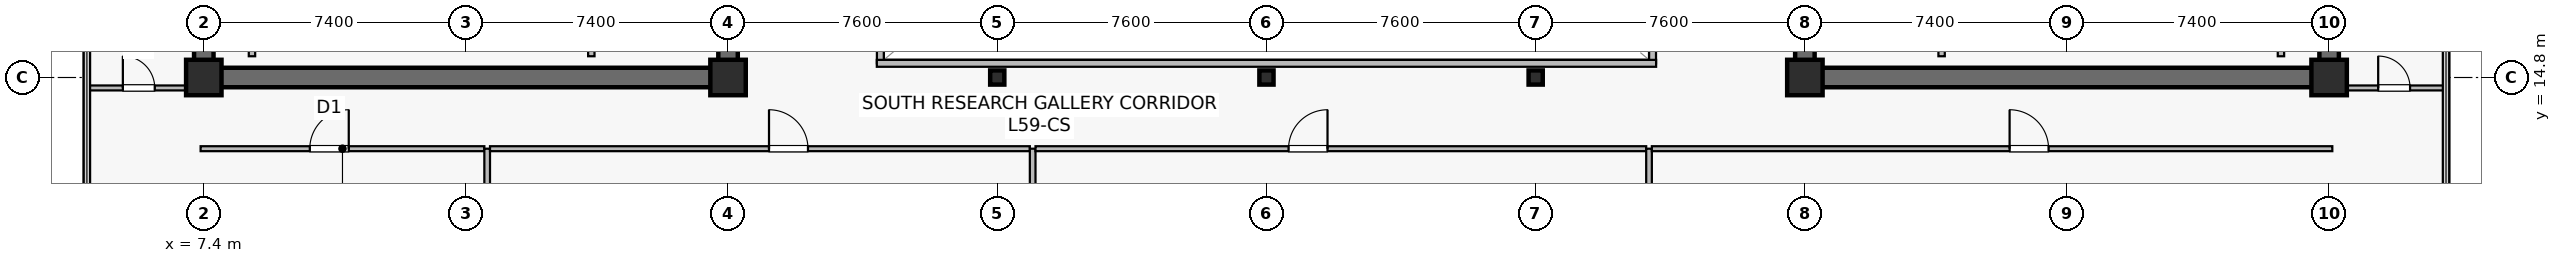
"""IFC4 building model, lengths in metres.
Left out: names, types, materials, properties, quantities, classifications, styles, units other than length and angle.
Written with IfcOpenShell. Run it as: python <this file> out.ifc"""

import sys

from ifc_helpers import new_model, si_unit, direction, frame, frame_2d, origin, origin_2d, place, context, subcontext, project, spatial, rectangle, hollow_rectangle, extrude, source, transform, mapped, element, fill, save


model = new_model("IFC4")
c1 = context("Model", 3, precision=1e-05, world=origin(), true_north=direction((0.0, 1.0)))
c2 = subcontext(c1, "Body", "Model", "MODEL_VIEW")
j1 = project(units=[si_unit("LENGTHUNIT", "METRE"), si_unit("PLANEANGLEUNIT", "RADIAN")], contexts=[c1])
p1 = place(None, origin())
s1 = spatial("IfcSite", under=j1, at=p1, CompositionType="ELEMENT")
p2 = place(p1, origin())
s2 = spatial("IfcBuilding", under=s1, at=p2, CompositionType="ELEMENT")
p3 = place(p2, frame((0.0, 0.0, 246.5)))
s3 = spatial("IfcBuildingStorey", under=s2, at=p3, CompositionType="ELEMENT", Elevation=246.5)
p4 = place(p3, frame((7.125, 14.8, 0.0), z_axis=(0.0, 0.0, 1.0), x_axis=(1.0, 0.0, 0.0)))
e1 = element("IfcWall", 1, at=p4, inside=s3, PredefinedType="SHEAR", context=c2, shape_type="SweptSolid", body=[
    extrude(rectangle(XDim=15.35, YDim=0.55, at=frame_2d((7.675, 0.0))), origin(), (0.0, 0.0, 1.0), 3.8),
])
p5 = place(p3, frame((7.4, 15.075, 0.0), z_axis=(0.0, 0.0, 1.0), x_axis=(0.0, 1.0, 0.0)))
e2 = element("IfcWall", 2, at=p5, inside=s3, PredefinedType="SHEAR", context=c2, shape_type="SweptSolid", body=[
    extrude(rectangle(XDim=18.45, YDim=0.55, at=frame_2d((9.225, 0.0))), origin(), (0.0, 0.0, 1.0), 3.8),
])
p6 = place(p3, frame((22.2, 15.075, 0.0), z_axis=(0.0, 0.0, 1.0), x_axis=(0.0, 1.0, 0.0)))
e3 = element("IfcWall", 3, at=p6, inside=s3, PredefinedType="SHEAR", context=c2, shape_type="SweptSolid", body=[
    extrude(rectangle(XDim=18.45, YDim=0.55, at=frame_2d((9.225, 0.0))), origin(), (0.0, 0.0, 1.0), 3.8),
])
p7 = place(p6, frame((3.475, 0.0, 0.0)))
e4 = element("IfcOpeningElement", 4, at=p7, cuts=e3, PredefinedType="OPENING", context=c2, shape_type="SweptSolid", body=[
    extrude(rectangle(XDim=1.42, YDim=2.2, at=frame_2d((0.71, 1.1))), frame((0.0, 0.285, 0.0), z_axis=(0.0, -1.0, 0.0), x_axis=(1.0, 0.0, 0.0)), (0.0, 0.0, 1.0), 0.57),
])
p8 = place(p3, frame((52.325, 14.8, 0.0), z_axis=(0.0, 0.0, 1.0), x_axis=(1.0, 0.0, 0.0)))
e5 = element("IfcWall", 5, at=p8, inside=s3, PredefinedType="SHEAR", context=c2, shape_type="SweptSolid", body=[
    extrude(rectangle(XDim=15.35, YDim=0.55, at=frame_2d((7.675, 0.0))), origin(), (0.0, 0.0, 1.0), 3.8),
])
p9 = place(p3, frame((52.6, 15.075, 0.0), z_axis=(0.0, 0.0, 1.0), x_axis=(0.0, 1.0, 0.0)))
e6 = element("IfcWall", 6, at=p9, inside=s3, PredefinedType="SHEAR", context=c2, shape_type="SweptSolid", body=[
    extrude(rectangle(XDim=18.45, YDim=0.55, at=frame_2d((9.225, 0.0))), origin(), (0.0, 0.0, 1.0), 3.8),
])
p10 = place(p9, frame((3.475, 0.0, 0.0)))
e7 = element("IfcOpeningElement", 7, at=p10, cuts=e6, PredefinedType="OPENING", context=c2, shape_type="SweptSolid", body=[
    extrude(rectangle(XDim=1.42, YDim=2.2, at=frame_2d((0.71, 1.1))), frame((0.0, 0.285, 0.0), z_axis=(0.0, -1.0, 0.0), x_axis=(1.0, 0.0, 0.0)), (0.0, 0.0, 1.0), 0.57),
])
p11 = place(p3, frame((67.4, 15.075, 0.0), z_axis=(0.0, 0.0, 1.0), x_axis=(0.0, 1.0, 0.0)))
e8 = element("IfcWall", 8, at=p11, inside=s3, PredefinedType="SHEAR", context=c2, shape_type="SweptSolid", body=[
    extrude(rectangle(XDim=18.45, YDim=0.55, at=frame_2d((9.225, 0.0))), origin(), (0.0, 0.0, 1.0), 3.8),
])
m1 = source(origin(), c2, "Body", "SweptSolid", [
    extrude(rectangle(XDim=1.0, YDim=1.0, at=origin_2d()), origin(), (0.0, 0.0, 1.0), 4.1),
])
for number, where, z_axis, x_axis in (
    (9, (7.4, 14.8, 0.0), (0.0, 0.0, 1.0), (1.0, 0.0, 0.0)),
    (10, (22.2, 14.8, 0.0), (0.0, 0.0, 1.0), (1.0, 0.0, 0.0)),
    (11, (52.6, 14.8, 0.0), (0.0, 0.0, 1.0), (1.0, 0.0, 0.0)),
    (12, (67.4, 14.8, 0.0), (0.0, 0.0, 1.0), (1.0, 0.0, 0.0)),
):
    element("IfcColumn", number, at=place(p3, frame(where, z_axis=z_axis, x_axis=x_axis)), inside=s3, PredefinedType="COLUMN", context=c2, shape_type="MappedRepresentation", body=[
        mapped(m1, transform((0.0, 0.0, 0.0), scale=1.0)),
    ])
m2 = source(origin(), c2, "Body", "SweptSolid", [
    extrude(hollow_rectangle(XDim=0.4, YDim=0.4, WallThickness=0.019, at=origin_2d()), origin(), (0.0, 0.0, 1.0), 4.1),
])
for number, where, z_axis, x_axis in (
    (13, (29.8, 14.8, 0.0), (0.0, 0.0, 1.0), (1.0, 0.0, 0.0)),
    (14, (37.4, 14.8, 0.0), (0.0, 0.0, 1.0), (1.0, 0.0, 0.0)),
    (15, (45.0, 14.8, 0.0), (0.0, 0.0, 1.0), (1.0, 0.0, 0.0)),
):
    element("IfcColumn", number, at=place(p3, frame(where, z_axis=z_axis, x_axis=x_axis)), inside=s3, PredefinedType="COLUMN", context=c2, shape_type="MappedRepresentation", body=[
        mapped(m2, transform((0.0, 0.0, 0.0), scale=1.0)),
    ])
for number, where, z_axis, x_axis in (
    (16, (18.34, 15.4, 0.0), (0.0, 0.0, 1.0), (0.0, 1.0, 0.0)),
    (17, (8.76, 15.4, 0.0), (0.0, 0.0, 1.0), (0.0, 1.0, 0.0)),
    (18, (56.46, 15.4, 0.0), (0.0, 0.0, 1.0), (0.0, 1.0, 0.0)),
    (19, (66.04, 15.4, 0.0), (0.0, 0.0, 1.0), (0.0, 1.0, 0.0)),
):
    element("IfcWall", number, at=place(p3, frame(where, z_axis=z_axis, x_axis=x_axis)), inside=s3, PredefinedType="SOLIDWALL", context=c2, shape_type="SweptSolid", body=[
        extrude(rectangle(XDim=2.4, YDim=0.18, at=frame_2d((1.2, 0.0))), origin(), (0.0, 0.0, 1.0), 3.8),
    ])
p12 = place(p3, frame((26.5, 15.2, 0.0), z_axis=(0.0, 0.0, 1.0), x_axis=(0.0, 1.0, 0.0)))
e20 = element("IfcWall", 20, at=p12, inside=s3, PredefinedType="SOLIDWALL", context=c2, shape_type="SweptSolid", body=[
    extrude(rectangle(XDim=18.2, YDim=0.195, at=frame_2d((9.1, 0.0))), origin(), (0.0, 0.0, 1.0), 3.8),
])
p13 = place(p12, frame((1.8, 0.0, 0.9)))
e21 = element("IfcOpeningElement", 21, at=p13, cuts=e20, PredefinedType="OPENING", context=c2, shape_type="SweptSolid", body=[
    extrude(rectangle(XDim=1.2, YDim=1.35, at=frame_2d((0.6, 0.675))), frame((0.0, 0.107, 0.0), z_axis=(0.0, -1.0, 0.0), x_axis=(1.0, 0.0, 0.0)), (0.0, 0.0, 1.0), 0.215),
])
p14 = place(p12, frame((13.2, 0.0, 0.9)))
e22 = element("IfcOpeningElement", 22, at=p14, cuts=e20, PredefinedType="OPENING", context=c2, shape_type="SweptSolid", body=[
    extrude(rectangle(XDim=1.2, YDim=1.35, at=frame_2d((0.6, 0.675))), frame((0.0, 0.107, 0.0), z_axis=(0.0, -1.0, 0.0), x_axis=(1.0, 0.0, 0.0)), (0.0, 0.0, 1.0), 0.215),
])
p15 = place(p3, frame((48.3, 15.2, 0.0), z_axis=(0.0, 0.0, 1.0), x_axis=(0.0, 1.0, 0.0)))
e23 = element("IfcWall", 23, at=p15, inside=s3, PredefinedType="SOLIDWALL", context=c2, shape_type="SweptSolid", body=[
    extrude(rectangle(XDim=18.2, YDim=0.195, at=frame_2d((9.1, 0.0))), origin(), (0.0, 0.0, 1.0), 3.8),
])
p16 = place(p15, frame((1.8, 0.0, 0.9)))
e24 = element("IfcOpeningElement", 24, at=p16, cuts=e23, PredefinedType="OPENING", context=c2, shape_type="SweptSolid", body=[
    extrude(rectangle(XDim=1.2, YDim=1.35, at=frame_2d((0.6, 0.675))), frame((0.0, 0.107, 0.0), z_axis=(0.0, -1.0, 0.0), x_axis=(1.0, 0.0, 0.0)), (0.0, 0.0, 1.0), 0.215),
])
p17 = place(p15, frame((13.2, 0.0, 0.9)))
e25 = element("IfcOpeningElement", 25, at=p17, cuts=e23, PredefinedType="OPENING", context=c2, shape_type="SweptSolid", body=[
    extrude(rectangle(XDim=1.2, YDim=1.35, at=frame_2d((0.6, 0.675))), frame((0.0, 0.107, 0.0), z_axis=(0.0, -1.0, 0.0), x_axis=(1.0, 0.0, 0.0)), (0.0, 0.0, 1.0), 0.215),
])
p18 = place(p3, frame((26.4, 15.2, 0.0), z_axis=(0.0, 0.0, 1.0), x_axis=(1.0, 0.0, 0.0)))
e26 = element("IfcWall", 26, at=p18, inside=s3, PredefinedType="SOLIDWALL", context=c2, shape_type="SweptSolid", body=[
    extrude(rectangle(XDim=22.0, YDim=0.195, at=frame_2d((11.0, 0.0))), origin(), (0.0, 0.0, 1.0), 3.8),
])
p19 = place(p3, frame((7.31, 12.79, 0.0), z_axis=(0.0, 0.0, 1.0), x_axis=(1.0, 0.0, 0.0)))
e27 = element("IfcWall", 27, at=p19, inside=s3, PredefinedType="PARTITIONING", context=c2, shape_type="SweptSolid", body=[
    extrude(rectangle(XDim=8.01, YDim=0.14, at=frame_2d((4.005, 0.0))), origin(), (0.0, 0.0, 1.0), 3.197),
])
p20 = place(p19, frame((3.083, 0.0, 0.0)))
e28 = element("IfcOpeningElement", 28, at=p20, cuts=e27, PredefinedType="OPENING", context=c2, shape_type="SweptSolid", body=[
    extrude(rectangle(XDim=1.1, YDim=2.18, at=frame_2d((0.55, 1.09))), frame((0.0, 0.08, 0.0), z_axis=(0.0, -1.0, 0.0), x_axis=(1.0, 0.0, 0.0)), (0.0, 0.0, 1.0), 0.16),
])
p21 = place(p3, frame((15.4, 2.71, 0.0), z_axis=(0.0, 0.0, 1.0), x_axis=(0.0, 1.0, 0.0)))
e29 = element("IfcWall", 29, at=p21, inside=s3, PredefinedType="PARTITIONING", context=c2, shape_type="SweptSolid", body=[
    extrude(rectangle(XDim=10.08, YDim=0.16, at=frame_2d((5.04, 0.0))), origin(), (0.0, 0.0, 1.0), 3.135),
])
p22 = place(p3, frame((15.48, 12.79, 0.0), z_axis=(0.0, 0.0, 1.0), x_axis=(1.0, 0.0, 0.0)))
e30 = element("IfcWall", 30, at=p22, inside=s3, PredefinedType="PARTITIONING", context=c2, shape_type="SweptSolid", body=[
    extrude(rectangle(XDim=15.24, YDim=0.14, at=frame_2d((7.62, 0.0))), origin(), (0.0, 0.0, 1.0), 3.197),
])
p23 = place(p22, frame((7.876, 0.0, 0.0)))
e31 = element("IfcOpeningElement", 31, at=p23, cuts=e30, PredefinedType="OPENING", context=c2, shape_type="SweptSolid", body=[
    extrude(rectangle(XDim=1.1, YDim=2.18, at=frame_2d((0.55, 1.09))), frame((0.0, 0.08, 0.0), z_axis=(0.0, -1.0, 0.0), x_axis=(1.0, 0.0, 0.0)), (0.0, 0.0, 1.0), 0.16),
])
p24 = place(p3, frame((30.8, 3.91, 0.0), z_axis=(0.0, 0.0, 1.0), x_axis=(0.0, 1.0, 0.0)))
e32 = element("IfcWall", 32, at=p24, inside=s3, PredefinedType="PARTITIONING", context=c2, shape_type="SweptSolid", body=[
    extrude(rectangle(XDim=8.88, YDim=0.16, at=frame_2d((4.44, 0.0))), origin(), (0.0, 0.0, 1.0), 3.135),
])
p25 = place(p3, frame((30.88, 12.79, 0.0), z_axis=(0.0, 0.0, 1.0), x_axis=(1.0, 0.0, 0.0)))
e33 = element("IfcWall", 33, at=p25, inside=s3, PredefinedType="PARTITIONING", context=c2, shape_type="SweptSolid", body=[
    extrude(rectangle(XDim=17.24, YDim=0.14, at=frame_2d((8.62, 0.0))), origin(), (0.0, 0.0, 1.0), 3.197),
])
p26 = place(p25, frame((7.144, 0.0, 0.0)))
e34 = element("IfcOpeningElement", 34, at=p26, cuts=e33, PredefinedType="OPENING", context=c2, shape_type="SweptSolid", body=[
    extrude(rectangle(XDim=1.1, YDim=2.18, at=frame_2d((0.55, 1.09))), frame((0.0, 0.08, 0.0), z_axis=(0.0, -1.0, 0.0), x_axis=(1.0, 0.0, 0.0)), (0.0, 0.0, 1.0), 0.16),
])
p27 = place(p3, frame((48.2, 3.91, 0.0), z_axis=(0.0, 0.0, 1.0), x_axis=(0.0, 1.0, 0.0)))
e35 = element("IfcWall", 35, at=p27, inside=s3, PredefinedType="PARTITIONING", context=c2, shape_type="SweptSolid", body=[
    extrude(rectangle(XDim=8.88, YDim=0.16, at=frame_2d((4.44, 0.0))), origin(), (0.0, 0.0, 1.0), 3.135),
])
p28 = place(p3, frame((48.28, 12.79, 0.0), z_axis=(0.0, 0.0, 1.0), x_axis=(1.0, 0.0, 0.0)))
e36 = element("IfcWall", 36, at=p28, inside=s3, PredefinedType="PARTITIONING", context=c2, shape_type="SweptSolid", body=[
    extrude(rectangle(XDim=19.21, YDim=0.14, at=frame_2d((9.605, 0.0))), origin(), (0.0, 0.0, 1.0), 3.197),
])
p29 = place(p28, frame((10.1, 0.0, 0.0)))
e37 = element("IfcOpeningElement", 37, at=p29, cuts=e36, PredefinedType="OPENING", context=c2, shape_type="SweptSolid", body=[
    extrude(rectangle(XDim=1.1, YDim=2.18, at=frame_2d((0.55, 1.09))), frame((0.0, 0.08, 0.0), z_axis=(0.0, -1.0, 0.0), x_axis=(1.0, 0.0, 0.0)), (0.0, 0.0, 1.0), 0.16),
])
p30 = place(p3, frame((4.11, 14.505, 0.0), z_axis=(0.0, 0.0, 1.0), x_axis=(1.0, 0.0, 0.0)))
e38 = element("IfcWall", 38, at=p30, inside=s3, PredefinedType="PARTITIONING", context=c2, shape_type="SweptSolid", body=[
    extrude(rectangle(XDim=2.91, YDim=0.14, at=frame_2d((1.455, 0.0))), origin(), (0.0, 0.0, 1.0), 3.8),
])
p31 = place(p30, frame((1.005, 0.0, 0.0)))
e39 = element("IfcOpeningElement", 39, at=p31, cuts=e38, PredefinedType="OPENING", context=c2, shape_type="SweptSolid", body=[
    extrude(rectangle(XDim=0.9, YDim=2.1, at=frame_2d((0.45, 1.05))), frame((0.0, 0.08, 0.0), z_axis=(0.0, -1.0, 0.0), x_axis=(1.0, 0.0, 0.0)), (0.0, 0.0, 1.0), 0.16),
])
p32 = place(p3, frame((67.78, 14.505, 0.0), z_axis=(0.0, 0.0, 1.0), x_axis=(1.0, 0.0, 0.0)))
e40 = element("IfcWall", 40, at=p32, inside=s3, PredefinedType="PARTITIONING", context=c2, shape_type="SweptSolid", body=[
    extrude(rectangle(XDim=2.91, YDim=0.14, at=frame_2d((1.455, 0.0))), origin(), (0.0, 0.0, 1.0), 3.8),
])
p33 = place(p32, frame((1.005, 0.0, 0.0)))
e41 = element("IfcOpeningElement", 41, at=p33, cuts=e40, PredefinedType="OPENING", context=c2, shape_type="SweptSolid", body=[
    extrude(rectangle(XDim=0.9, YDim=2.1, at=frame_2d((0.45, 1.05))), frame((0.0, 0.08, 0.0), z_axis=(0.0, -1.0, 0.0), x_axis=(1.0, 0.0, 0.0)), (0.0, 0.0, 1.0), 0.16),
])
m3 = source(origin(), c2, "Body", "SweptSolid", [
    extrude(rectangle(XDim=1.1, YDim=2.18, at=frame_2d((0.55, 1.09))), frame((0.0, 0.025, 0.0), z_axis=(0.0, -1.0, 0.0), x_axis=(1.0, 0.0, 0.0)), (0.0, 0.0, 1.0), 0.05),
])
p34 = place(p20, origin())
e42 = element("IfcDoor", 42, at=p34, inside=s3, OperationType="SINGLE_SWING_RIGHT", PredefinedType="DOOR", context=c2, shape_type="MappedRepresentation", body=[
    mapped(m3, transform((0.0, 0.0, 0.0), scale=1.0)),
])
fill(e28, e42)
p35 = place(p23, origin())
e43 = element("IfcDoor", 43, at=p35, inside=s3, OperationType="SINGLE_SWING_LEFT", PredefinedType="DOOR", context=c2, shape_type="MappedRepresentation", body=[
    mapped(m3, transform((0.0, 0.0, 0.0), scale=1.0)),
])
fill(e31, e43)
p36 = place(p26, origin())
e44 = element("IfcDoor", 44, at=p36, inside=s3, OperationType="SINGLE_SWING_RIGHT", PredefinedType="DOOR", context=c2, shape_type="MappedRepresentation", body=[
    mapped(m3, transform((0.0, 0.0, 0.0), scale=1.0)),
])
fill(e34, e44)
p37 = place(p29, origin())
e45 = element("IfcDoor", 45, at=p37, inside=s3, OperationType="SINGLE_SWING_LEFT", PredefinedType="DOOR", context=c2, shape_type="MappedRepresentation", body=[
    mapped(m3, transform((0.0, 0.0, 0.0), scale=1.0)),
])
fill(e37, e45)
m4 = source(origin(), c2, "Body", "SweptSolid", [
    extrude(rectangle(XDim=0.9, YDim=2.1, at=frame_2d((0.45, 1.05))), frame((0.0, 0.025, 0.0), z_axis=(0.0, -1.0, 0.0), x_axis=(1.0, 0.0, 0.0)), (0.0, 0.0, 1.0), 0.05),
])
p38 = place(p31, origin())
e46 = element("IfcDoor", 46, at=p38, inside=s3, OperationType="SINGLE_SWING_LEFT", PredefinedType="DOOR", context=c2, shape_type="MappedRepresentation", body=[
    mapped(m4, transform((0.0, 0.0, 0.0), scale=1.0)),
])
fill(e39, e46)
p39 = place(p33, origin())
e47 = element("IfcDoor", 47, at=p39, inside=s3, OperationType="SINGLE_SWING_LEFT", PredefinedType="DOOR", context=c2, shape_type="MappedRepresentation", body=[
    mapped(m4, transform((0.0, 0.0, 0.0), scale=1.0)),
])
fill(e41, e47)
save(model, sys.argv[1])
